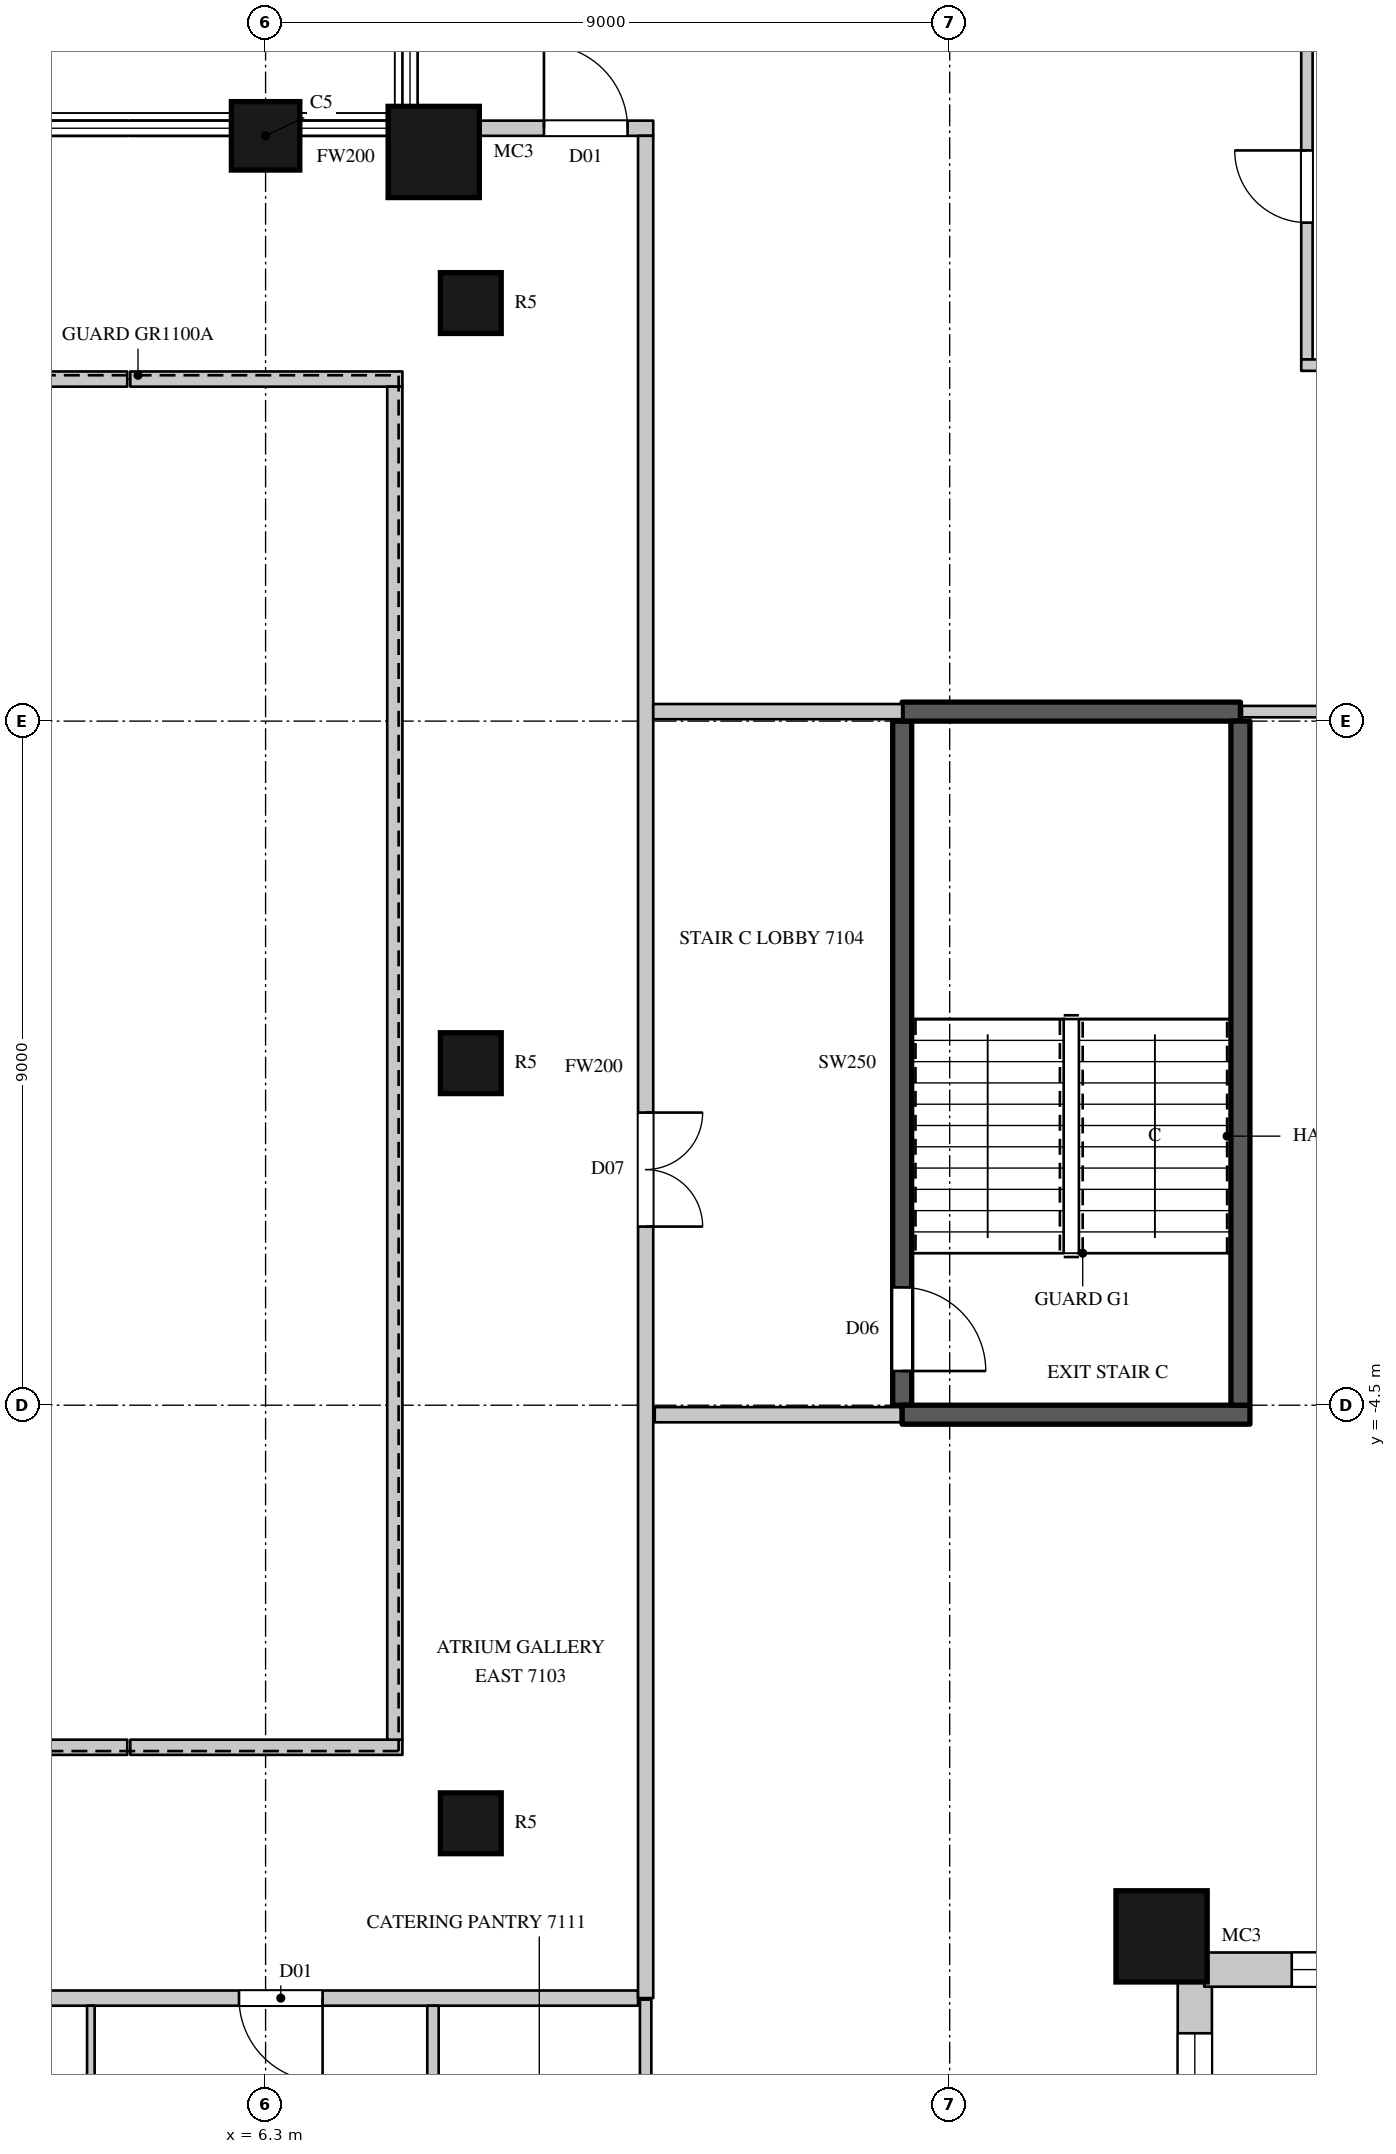
"""IFC4 building model, lengths in metres.
Left out: names, types, materials, properties, quantities, classifications, styles, units other than length and angle.
Written with IfcOpenShell. Run it as: python <this file> out.ifc"""

import sys

from ifc_helpers import new_model, si_unit, direction, frame, frame_2d, origin, origin_2d, place, context, subcontext, project, spatial, rectangle, circle, extrude, element, fill, save


model = new_model("IFC4")
c1 = context("Model", 3, precision=1e-05, world=origin(), true_north=direction((0.0, 1.0)))
c2 = subcontext(c1, "Body", "Model", "MODEL_VIEW")
j1 = project(units=[si_unit("LENGTHUNIT", "METRE"), si_unit("PLANEANGLEUNIT", "RADIAN")], contexts=[c1])
p1 = place(None, origin())
s1 = spatial("IfcSite", under=j1, at=p1, CompositionType="ELEMENT")
p2 = place(p1, origin())
s2 = spatial("IfcBuilding", under=s1, at=p2, CompositionType="ELEMENT")
p3 = place(p2, frame((0.0, 0.0, 313.1)))
s3 = spatial("IfcBuildingStorey", under=s2, at=p3, CompositionType="ELEMENT", Elevation=313.1)
p4 = place(p3, frame((8.512, 11.988, 0.0), z_axis=(0.0, 0.0, 1.0), x_axis=(1.0, 0.0, 0.0)))
e1 = element("IfcColumn", 1, at=p4, inside=s3, PredefinedType="COLUMN", context=c2, shape_type="SweptSolid", body=[
    extrude(circle(Radius=0.6, at=origin_2d()), origin(), (0.0, 0.0, 1.0), 4.1),
])
p5 = place(p3, frame((6.3, 12.2, 0.0), z_axis=(0.0, 0.0, 1.0), x_axis=(-1.0, 0.0, 0.0)))
e2 = element("IfcColumn", 2, at=p5, inside=s3, PredefinedType="COLUMN", context=c2, shape_type="SweptSolid", body=[
    extrude(rectangle(XDim=0.9, YDim=0.9, at=origin_2d()), origin(), (0.0, 0.0, 1.0), 4.1),
])
p6 = place(p3, frame((18.088, -11.488, 0.0), z_axis=(0.0, 0.0, 1.0), x_axis=(1.0, 0.0, 0.0)))
e3 = element("IfcColumn", 3, at=p6, inside=s3, PredefinedType="COLUMN", context=c2, shape_type="SweptSolid", body=[
    extrude(circle(Radius=0.6, at=origin_2d()), origin(), (0.0, 0.0, 1.0), 4.1),
])
for number, where, z_axis, x_axis in (
    (4, (9.0, -10.0, 0.0), (0.0, 0.0, 1.0), (1.0, 0.0, 0.0)),
    (5, (9.0, 0.0, 0.0), (0.0, 0.0, 1.0), (1.0, 0.0, 0.0)),
    (6, (9.0, 10.0, 0.0), (0.0, 0.0, 1.0), (1.0, 0.0, 0.0)),
):
    element("IfcColumn", number, at=place(p3, frame(where, z_axis=z_axis, x_axis=x_axis)), inside=s3, PredefinedType="COLUMN", context=c2, shape_type="SweptSolid", body=[
        extrude(circle(Radius=0.4, at=origin_2d()), origin(), (0.0, 0.0, 1.0), 4.1),
    ])
p7 = place(p3, frame((18.525, -16.304, 0.0), z_axis=(0.0, 0.0, 1.0), x_axis=(0.0, 1.0, 0.0)))
e7 = element("IfcWall", 7, at=p7, inside=s3, PredefinedType="SOLIDWALL", context=c2, shape_type="SweptSolid", body=[
    extrude(rectangle(XDim=4.255, YDim=0.45, at=frame_2d((2.128, 0.0))), origin(), (0.0, 0.0, 1.0), 3.8),
])
p8 = place(p7, frame((0.541, 0.0, 1.05)))
e8 = element("IfcOpeningElement", 8, at=p8, cuts=e7, PredefinedType="OPENING", context=c2, shape_type="SweptSolid", body=[
    extrude(rectangle(XDim=3.0, YDim=2.4, at=frame_2d((1.5, 1.2))), frame((0.0, 0.235, 0.0), z_axis=(0.0, -1.0, 0.0), x_axis=(1.0, 0.0, 0.0)), (0.0, 0.0, 1.0), 0.47),
])
p9 = place(p3, frame((18.648, -11.925, 0.0), z_axis=(0.0, 0.0, 1.0), x_axis=(1.0, 0.0, 0.0)))
e9 = element("IfcWall", 9, at=p9, inside=s3, PredefinedType="SOLIDWALL", context=c2, shape_type="SweptSolid", body=[
    extrude(rectangle(XDim=5.015, YDim=0.45, at=frame_2d((2.508, 0.0))), origin(), (0.0, 0.0, 1.0), 3.8),
])
p10 = place(p9, frame((1.152, 0.0, 1.05)))
e10 = element("IfcOpeningElement", 10, at=p10, cuts=e9, PredefinedType="OPENING", context=c2, shape_type="SweptSolid", body=[
    extrude(rectangle(XDim=3.0, YDim=2.4, at=frame_2d((1.5, 1.2))), frame((0.0, 0.235, 0.0), z_axis=(0.0, -1.0, 0.0), x_axis=(1.0, 0.0, 0.0)), (0.0, 0.0, 1.0), 0.47),
])
p11 = place(p3, frame((-10.9, -12.3, 0.0), z_axis=(0.0, 0.0, 1.0), x_axis=(1.0, 0.0, 0.0)))
e11 = element("IfcWall", 11, at=p11, inside=s3, PredefinedType="PARTITIONING", context=c2, shape_type="SweptSolid", body=[
    extrude(rectangle(XDim=22.1, YDim=0.2, at=frame_2d((11.05, 0.0))), origin(), (0.0, 0.0, 1.0), 3.8),
])
p12 = place(p11, frame((0.95, 0.0, 0.0)))
e12 = element("IfcOpeningElement", 12, at=p12, cuts=e11, PredefinedType="OPENING", context=c2, shape_type="SweptSolid", body=[
    extrude(rectangle(XDim=0.9, YDim=2.2, at=frame_2d((0.45, 1.1))), frame((0.0, 0.11, 0.0), z_axis=(0.0, -1.0, 0.0), x_axis=(1.0, 0.0, 0.0)), (0.0, 0.0, 1.0), 0.22),
])
p13 = place(p11, frame((3.95, 0.0, 0.0)))
e13 = element("IfcOpeningElement", 13, at=p13, cuts=e11, PredefinedType="OPENING", context=c2, shape_type="SweptSolid", body=[
    extrude(rectangle(XDim=0.9, YDim=2.2, at=frame_2d((0.45, 1.1))), frame((0.0, 0.11, 0.0), z_axis=(0.0, -1.0, 0.0), x_axis=(1.0, 0.0, 0.0)), (0.0, 0.0, 1.0), 0.22),
])
p14 = place(p11, frame((7.1, 0.0, 0.0)))
e14 = element("IfcOpeningElement", 14, at=p14, cuts=e11, PredefinedType="OPENING", context=c2, shape_type="SweptSolid", body=[
    extrude(rectangle(XDim=0.9, YDim=2.2, at=frame_2d((0.45, 1.1))), frame((0.0, 0.11, 0.0), z_axis=(0.0, -1.0, 0.0), x_axis=(1.0, 0.0, 0.0)), (0.0, 0.0, 1.0), 0.22),
])
p15 = place(p11, frame((10.0, 0.0, 0.0)))
e15 = element("IfcOpeningElement", 15, at=p15, cuts=e11, PredefinedType="OPENING", context=c2, shape_type="SweptSolid", body=[
    extrude(rectangle(XDim=0.9, YDim=2.2, at=frame_2d((0.45, 1.1))), frame((0.0, 0.11, 0.0), z_axis=(0.0, -1.0, 0.0), x_axis=(1.0, 0.0, 0.0)), (0.0, 0.0, 1.0), 0.22),
])
p16 = place(p11, frame((13.25, 0.0, 0.0)))
e16 = element("IfcOpeningElement", 16, at=p16, cuts=e11, PredefinedType="OPENING", context=c2, shape_type="SweptSolid", body=[
    extrude(rectangle(XDim=0.9, YDim=2.2, at=frame_2d((0.45, 1.1))), frame((0.0, 0.11, 0.0), z_axis=(0.0, -1.0, 0.0), x_axis=(1.0, 0.0, 0.0)), (0.0, 0.0, 1.0), 0.22),
])
p17 = place(p11, frame((16.85, 0.0, 0.0)))
e17 = element("IfcOpeningElement", 17, at=p17, cuts=e11, PredefinedType="OPENING", context=c2, shape_type="SweptSolid", body=[
    extrude(rectangle(XDim=1.1, YDim=2.4, at=frame_2d((0.55, 1.2))), frame((0.0, 0.11, 0.0), z_axis=(0.0, -1.0, 0.0), x_axis=(1.0, 0.0, 0.0)), (0.0, 0.0, 1.0), 0.22),
])
p18 = place(p3, frame((-2.25, 12.3, 0.0), z_axis=(0.0, 0.0, 1.0), x_axis=(1.0, 0.0, 0.0)))
e18 = element("IfcWall", 18, at=p18, inside=s3, PredefinedType="PARTITIONING", context=c2, shape_type="SweptSolid", body=[
    extrude(rectangle(XDim=6.73, YDim=0.2, at=frame_2d((3.365, 0.0))), origin(), (0.0, 0.0, 1.0), 3.8),
])
for number, where, z_axis, x_axis in (
    (19, (-6.1, -9.0, 0.0), (0.0, 0.0, 1.0), (1.0, 0.0, 0.0)),
    (20, (-6.1, 9.0, 0.0), (0.0, 0.0, 1.0), (1.0, 0.0, 0.0)),
):
    element("IfcWall", number, at=place(p3, frame(where, z_axis=z_axis, x_axis=x_axis)), inside=s3, PredefinedType="PARTITIONING", context=c2, shape_type="SweptSolid", body=[
        extrude(rectangle(XDim=10.58, YDim=0.2, at=frame_2d((5.29, 0.0))), origin(), (0.0, 0.0, 1.0), 3.8),
    ])
for number, where, z_axis, x_axis in (
    (21, (4.52, -9.0, 0.0), (0.0, 0.0, 1.0), (1.0, 0.0, 0.0)),
    (22, (4.52, 9.0, 0.0), (0.0, 0.0, 1.0), (1.0, 0.0, 0.0)),
):
    element("IfcWall", number, at=place(p3, frame(where, z_axis=z_axis, x_axis=x_axis)), inside=s3, PredefinedType="PARTITIONING", context=c2, shape_type="SweptSolid", body=[
        extrude(rectangle(XDim=3.58, YDim=0.2, at=frame_2d((1.79, 0.0))), origin(), (0.0, 0.0, 1.0), 3.8),
    ])
p19 = place(p3, frame((4.52, 12.3, 0.0), z_axis=(0.0, 0.0, 1.0), x_axis=(1.0, 0.0, 0.0)))
e23 = element("IfcWall", 23, at=p19, inside=s3, PredefinedType="PARTITIONING", context=c2, shape_type="SweptSolid", body=[
    extrude(rectangle(XDim=1.33, YDim=0.2, at=frame_2d((0.665, 0.0))), origin(), (0.0, 0.0, 1.0), 3.8),
])
p20 = place(p3, frame((6.75, 12.3, 0.0), z_axis=(0.0, 0.0, 1.0), x_axis=(1.0, 0.0, 0.0)))
e24 = element("IfcWall", 24, at=p20, inside=s3, PredefinedType="PARTITIONING", context=c2, shape_type="SweptSolid", body=[
    extrude(rectangle(XDim=1.212, YDim=0.2, at=frame_2d((0.606, 0.0))), origin(), (0.0, 0.0, 1.0), 3.8),
])
p21 = place(p3, frame((8.0, -8.9, 0.0), z_axis=(0.0, 0.0, 1.0), x_axis=(0.0, 1.0, 0.0)))
e25 = element("IfcWall", 25, at=p21, inside=s3, PredefinedType="PARTITIONING", context=c2, shape_type="SweptSolid", body=[
    extrude(rectangle(XDim=17.8, YDim=0.2, at=frame_2d((8.9, 0.0))), origin(), (0.0, 0.0, 1.0), 3.8),
])
p22 = place(p3, frame((9.062, 12.3, 0.0), z_axis=(0.0, 0.0, 1.0), x_axis=(1.0, 0.0, 0.0)))
e26 = element("IfcWall", 26, at=p22, inside=s3, PredefinedType="PARTITIONING", context=c2, shape_type="SweptSolid", body=[
    extrude(rectangle(XDim=2.338, YDim=0.2, at=frame_2d((1.169, 0.0))), origin(), (0.0, 0.0, 1.0), 3.8),
])
p23 = place(p22, frame((0.9, 0.0, 0.0)))
e27 = element("IfcOpeningElement", 27, at=p23, cuts=e26, PredefinedType="OPENING", context=c2, shape_type="SweptSolid", body=[
    extrude(rectangle(XDim=1.1, YDim=2.4, at=frame_2d((0.55, 1.2))), frame((0.0, 0.11, 0.0), z_axis=(0.0, -1.0, 0.0), x_axis=(1.0, 0.0, 0.0)), (0.0, 0.0, 1.0), 0.22),
])
p24 = place(p3, frame((11.3, -12.3, 0.0), z_axis=(0.0, 0.0, 1.0), x_axis=(0.0, 1.0, 0.0)))
e28 = element("IfcWall", 28, at=p24, inside=s3, PredefinedType="PARTITIONING", context=c2, shape_type="SweptSolid", body=[
    extrude(rectangle(XDim=24.5, YDim=0.2, at=frame_2d((12.25, 0.0))), origin(), (0.0, 0.0, 1.0), 3.8),
])
p25 = place(p24, frame((10.15, 0.0, 0.0)))
e29 = element("IfcOpeningElement", 29, at=p25, cuts=e28, PredefinedType="OPENING", context=c2, shape_type="SweptSolid", body=[
    extrude(rectangle(XDim=1.5, YDim=2.4, at=frame_2d((0.75, 1.2))), frame((0.0, 0.11, 0.0), z_axis=(0.0, -1.0, 0.0), x_axis=(1.0, 0.0, 0.0)), (0.0, 0.0, 1.0), 0.22),
])
p26 = place(p3, frame((11.4, 4.625, 0.0), z_axis=(0.0, 0.0, 1.0), x_axis=(1.0, 0.0, 0.0)))
e30 = element("IfcWall", 30, at=p26, inside=s3, PredefinedType="PARTITIONING", context=c2, shape_type="SweptSolid", body=[
    extrude(rectangle(XDim=3.275, YDim=0.2, at=frame_2d((1.638, 0.0))), origin(), (0.0, 0.0, 1.0), 3.8),
])
p27 = place(p3, frame((11.42, -4.625, 0.0), z_axis=(0.0, 0.0, 1.0), x_axis=(1.0, 0.0, 0.0)))
e31 = element("IfcWall", 31, at=p27, inside=s3, PredefinedType="PARTITIONING", context=c2, shape_type="SweptSolid", body=[
    extrude(rectangle(XDim=3.235, YDim=0.2, at=frame_2d((1.618, 0.0))), origin(), (0.0, 0.0, 1.0), 3.8),
])
p28 = place(p3, frame((8.502, -16.425, 0.0), z_axis=(0.0, 0.0, 1.0), x_axis=(0.0, 1.0, 0.0)))
e32 = element("IfcWall", 32, at=p28, inside=s3, PredefinedType="PARTITIONING", context=c2, shape_type="SweptSolid", body=[
    extrude(rectangle(XDim=4.025, YDim=0.15, at=frame_2d((2.013, 0.0))), origin(), (0.0, 0.0, 1.0), 3.8),
])
p29 = place(p28, frame((1.55, 0.0, 0.0)))
e33 = element("IfcOpeningElement", 33, at=p29, cuts=e32, PredefinedType="OPENING", context=c2, shape_type="SweptSolid", body=[
    extrude(rectangle(XDim=0.95, YDim=2.2, at=frame_2d((0.475, 1.1))), frame((0.0, 0.085, 0.0), z_axis=(0.0, -1.0, 0.0), x_axis=(1.0, 0.0, 0.0)), (0.0, 0.0, 1.0), 0.17),
])
p30 = place(p3, frame((11.3, -16.5, 0.0), z_axis=(0.0, 0.0, 1.0), x_axis=(0.0, 1.0, 0.0)))
e34 = element("IfcWall", 34, at=p30, inside=s3, PredefinedType="PARTITIONING", context=c2, shape_type="SweptSolid", body=[
    extrude(rectangle(XDim=4.18, YDim=0.15, at=frame_2d((2.09, 0.0))), origin(), (0.0, 0.0, 1.0), 3.8),
])
p31 = place(p3, frame((19.145, 4.625, 0.0), z_axis=(0.0, 0.0, 1.0), x_axis=(1.0, 0.0, 0.0)))
e35 = element("IfcWall", 35, at=p31, inside=s3, PredefinedType="PARTITIONING", context=c2, shape_type="SweptSolid", body=[
    extrude(rectangle(XDim=4.705, YDim=0.15, at=frame_2d((2.353, 0.0))), origin(), (0.0, 0.0, 1.0), 3.8),
])
p32 = place(p3, frame((20.0, 9.258, 0.0), z_axis=(0.0, 0.0, 1.0), x_axis=(0.0, 1.0, 0.0)))
e36 = element("IfcWall", 36, at=p32, inside=s3, PredefinedType="PARTITIONING", context=c2, shape_type="SweptSolid", body=[
    extrude(rectangle(XDim=4.532, YDim=0.15, at=frame_2d((2.266, 0.0))), origin(), (0.0, 0.0, 1.0), 3.8),
])
p33 = place(p32, frame((1.8, 0.0, 0.0)))
e37 = element("IfcOpeningElement", 37, at=p33, cuts=e36, PredefinedType="OPENING", context=c2, shape_type="SweptSolid", body=[
    extrude(rectangle(XDim=0.95, YDim=2.2, at=frame_2d((0.475, 1.1))), frame((0.0, 0.085, 0.0), z_axis=(0.0, -1.0, 0.0), x_axis=(1.0, 0.0, 0.0)), (0.0, 0.0, 1.0), 0.17),
])
p34 = place(p3, frame((19.925, 9.183, 0.0), z_axis=(0.0, 0.0, 1.0), x_axis=(1.0, 0.0, 0.0)))
e38 = element("IfcWall", 38, at=p34, inside=s3, PredefinedType="PARTITIONING", context=c2, shape_type="SweptSolid", body=[
    extrude(rectangle(XDim=4.375, YDim=0.15, at=frame_2d((2.188, 0.0))), origin(), (0.0, 0.0, 1.0), 3.15),
])
p35 = place(p3, frame((14.675, -4.5, 0.0), z_axis=(0.0, 0.0, 1.0), x_axis=(0.0, 1.0, 0.0)))
e39 = element("IfcWall", 39, at=p35, inside=s3, PredefinedType="SHEAR", context=c2, shape_type="SweptSolid", body=[
    extrude(rectangle(XDim=9.0, YDim=0.25, at=frame_2d((4.5, 0.0))), origin(), (0.0, 0.0, 1.0), 3.8),
])
p36 = place(p35, frame((0.45, 0.0, 0.0)))
e40 = element("IfcOpeningElement", 40, at=p36, cuts=e39, PredefinedType="OPENING", context=c2, shape_type="SweptSolid", body=[
    extrude(rectangle(XDim=1.1, YDim=2.2, at=frame_2d((0.55, 1.1))), frame((0.0, 0.135, 0.0), z_axis=(0.0, -1.0, 0.0), x_axis=(1.0, 0.0, 0.0)), (0.0, 0.0, 1.0), 0.27),
])
p37 = place(p3, frame((14.675, -4.625, 0.0), z_axis=(0.0, 0.0, 1.0), x_axis=(1.0, 0.0, 0.0)))
e41 = element("IfcWall", 41, at=p37, inside=s3, PredefinedType="SHEAR", context=c2, shape_type="SweptSolid", body=[
    extrude(rectangle(XDim=4.575, YDim=0.25, at=frame_2d((2.288, 0.0))), origin(), (0.0, 0.0, 1.0), 3.8),
])
p38 = place(p3, frame((14.675, 4.625, 0.0), z_axis=(0.0, 0.0, 1.0), x_axis=(1.0, 0.0, 0.0)))
e42 = element("IfcWall", 42, at=p38, inside=s3, PredefinedType="SHEAR", context=c2, shape_type="SweptSolid", body=[
    extrude(rectangle(XDim=4.45, YDim=0.25, at=frame_2d((2.225, 0.0))), origin(), (0.0, 0.0, 1.0), 3.8),
])
p39 = place(p3, frame((19.125, -4.5, 0.0), z_axis=(0.0, 0.0, 1.0), x_axis=(0.0, 1.0, 0.0)))
e43 = element("IfcWall", 43, at=p39, inside=s3, PredefinedType="SHEAR", context=c2, shape_type="SweptSolid", body=[
    extrude(rectangle(XDim=9.0, YDim=0.25, at=frame_2d((4.5, 0.0))), origin(), (0.0, 0.0, 1.0), 3.8),
])
p40 = place(p3, frame((4.001, -22.999, 0.0), z_axis=(0.0, 0.0, 1.0), x_axis=(0.0, 1.0, 0.0)))
e44 = element("IfcWall", 44, at=p40, inside=s3, PredefinedType="PARTITIONING", context=c2, shape_type="SweptSolid", body=[
    extrude(rectangle(XDim=10.599, YDim=0.1, at=frame_2d((5.3, 0.0))), origin(), (0.0, 0.0, 1.0), 3.8),
])
p41 = place(p8, origin())
e45 = element("IfcWindow", 45, at=p41, inside=s3, PartitioningType="SINGLE_PANEL", PredefinedType="WINDOW", context=c2, shape_type="SweptSolid", body=[
    extrude(rectangle(XDim=3.0, YDim=2.4, at=frame_2d((1.5, 1.2))), frame((0.0, 0.135, 0.0), z_axis=(0.0, -1.0, 0.0), x_axis=(1.0, 0.0, 0.0)), (0.0, 0.0, 1.0), 0.06),
])
fill(e8, e45)
p42 = place(p10, origin())
e46 = element("IfcWindow", 46, at=p42, inside=s3, PartitioningType="SINGLE_PANEL", PredefinedType="WINDOW", context=c2, shape_type="SweptSolid", body=[
    extrude(rectangle(XDim=3.0, YDim=2.4, at=frame_2d((1.5, 1.2))), frame((0.0, 0.135, 0.0), z_axis=(0.0, -1.0, 0.0), x_axis=(1.0, 0.0, 0.0)), (0.0, 0.0, 1.0), 0.06),
])
fill(e10, e46)
p43 = place(p25, origin())
e47 = element("IfcDoor", 47, at=p43, inside=s3, OperationType="DOUBLE_DOOR_SINGLE_SWING", PredefinedType="DOOR", context=c2, shape_type="SweptSolid", body=[
    extrude(rectangle(XDim=1.5, YDim=2.4, at=frame_2d((0.75, 1.2))), frame((0.0, 0.025, 0.0), z_axis=(0.0, -1.0, 0.0), x_axis=(1.0, 0.0, 0.0)), (0.0, 0.0, 1.0), 0.05),
])
fill(e29, e47)
p44 = place(p17, origin())
e48 = element("IfcDoor", 48, at=p44, inside=s3, OperationType="SINGLE_SWING_LEFT", PredefinedType="DOOR", context=c2, shape_type="SweptSolid", body=[
    extrude(rectangle(XDim=1.1, YDim=2.4, at=frame_2d((0.55, 1.2))), frame((0.0, 0.025, 0.0), z_axis=(0.0, -1.0, 0.0), x_axis=(1.0, 0.0, 0.0)), (0.0, 0.0, 1.0), 0.05),
])
fill(e17, e48)
p45 = place(p23, origin())
e49 = element("IfcDoor", 49, at=p45, inside=s3, OperationType="SINGLE_SWING_LEFT", PredefinedType="DOOR", context=c2, shape_type="SweptSolid", body=[
    extrude(rectangle(XDim=1.1, YDim=2.4, at=frame_2d((0.55, 1.2))), frame((0.0, 0.025, 0.0), z_axis=(0.0, -1.0, 0.0), x_axis=(1.0, 0.0, 0.0)), (0.0, 0.0, 1.0), 0.05),
])
fill(e27, e49)
p46 = place(p33, origin())
e50 = element("IfcDoor", 50, at=p46, inside=s3, OperationType="SINGLE_SWING_RIGHT", PredefinedType="DOOR", context=c2, shape_type="SweptSolid", body=[
    extrude(rectangle(XDim=0.95, YDim=2.2, at=frame_2d((0.475, 1.1))), frame((0.0, 0.025, 0.0), z_axis=(0.0, -1.0, 0.0), x_axis=(1.0, 0.0, 0.0)), (0.0, 0.0, 1.0), 0.05),
])
fill(e37, e50)
p47 = place(p36, origin())
e51 = element("IfcDoor", 51, at=p47, inside=s3, OperationType="SINGLE_SWING_RIGHT", PredefinedType="DOOR", context=c2, shape_type="SweptSolid", body=[
    extrude(rectangle(XDim=1.1, YDim=2.2, at=frame_2d((0.55, 1.1))), frame((0.0, 0.025, 0.0), z_axis=(0.0, -1.0, 0.0), x_axis=(1.0, 0.0, 0.0)), (0.0, 0.0, 1.0), 0.05),
])
fill(e40, e51)
save(model, sys.argv[1])
